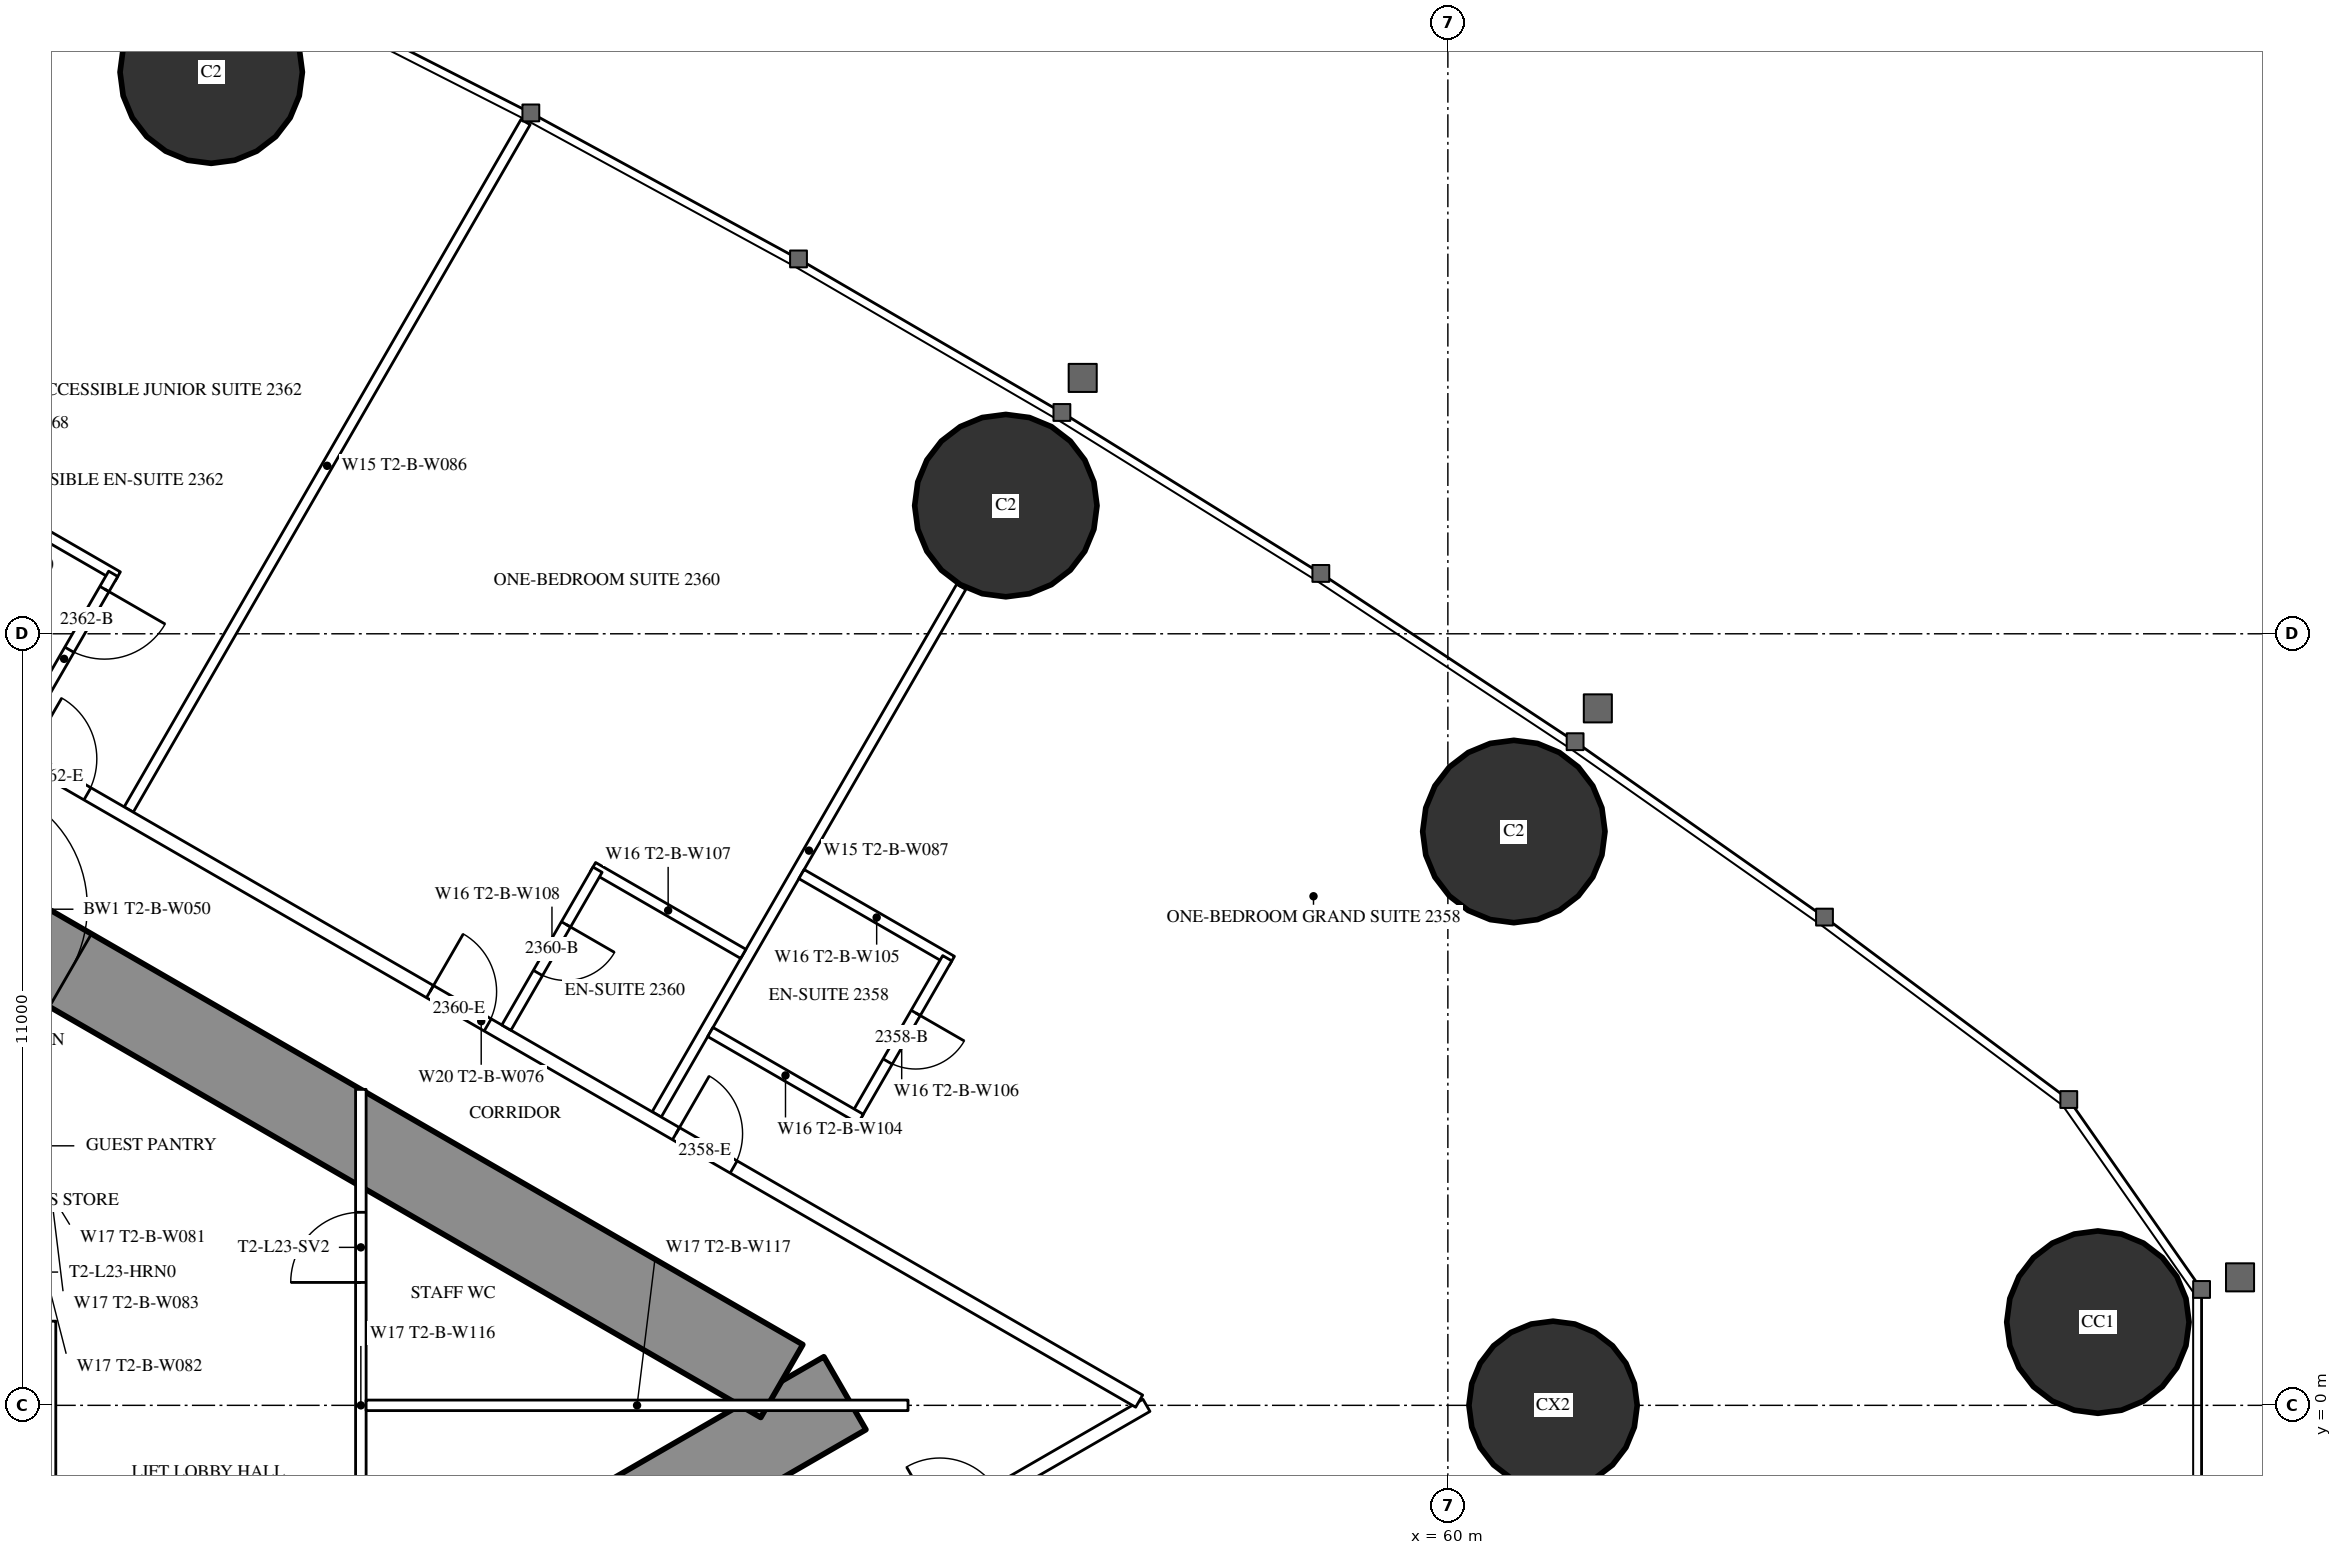
"""IFC4 building model, lengths in metres.
Left out: names, types, materials, properties, quantities, classifications, styles, units other than length and angle.
Written with IfcOpenShell. Run it as: python <this file> out.ifc"""

import sys

from ifc_helpers import new_model, si_unit, direction, frame, frame_2d, origin, origin_2d, place, context, subcontext, project, spatial, rectangle, circle, hollow_circle, extrude, element, fill, save


model = new_model("IFC4")
c1 = context("Model", 3, precision=1e-05, world=origin(), true_north=direction((0.0, 1.0)))
c2 = subcontext(c1, "Body", "Model", "MODEL_VIEW")
j1 = project(units=[si_unit("LENGTHUNIT", "METRE"), si_unit("PLANEANGLEUNIT", "RADIAN")], contexts=[c1])
p1 = place(None, origin())
s1 = spatial("IfcSite", under=j1, at=p1, CompositionType="ELEMENT")
p2 = place(p1, origin())
s2 = spatial("IfcBuilding", under=s1, at=p2, CompositionType="ELEMENT")
p3 = place(p2, frame((0.0, 0.0, 90.6)))
s3 = spatial("IfcBuildingStorey", under=s2, at=p3, CompositionType="ELEMENT", Elevation=90.6)
for number, where, z_axis, x_axis in (
    (1, (69.269, 1.187, 0.0), (0.0, 0.0, 1.0), (1.0, 0.0, 0.0)),
    (2, (60.941, 8.181, 0.0), (0.0, 0.0, 1.0), (1.0, 0.0, 0.0)),
    (3, (53.697, 12.827, 0.0), (0.0, 0.0, 1.0), (1.0, 0.0, 0.0)),
    (4, (42.366, 19.007, 0.0), (0.0, 0.0, 1.0), (1.0, 0.0, 0.0)),
):
    element("IfcColumn", number, at=place(p3, frame(where, z_axis=z_axis, x_axis=x_axis)), inside=s3, PredefinedType="COLUMN", context=c2, shape_type="SweptSolid", body=[
        extrude(hollow_circle(Radius=1.3, WallThickness=0.1, at=origin_2d()), origin(), (0.0, 0.0, 1.0), 3.5),
    ])
p4 = place(p3, frame((61.5, 0.0, 0.0), z_axis=(0.0, 0.0, 1.0), x_axis=(1.0, 0.0, 0.0)))
e5 = element("IfcColumn", 5, at=p4, inside=s3, PredefinedType="COLUMN", context=c2, shape_type="SweptSolid", body=[
    extrude(circle(Radius=1.2, at=origin_2d()), origin(), (0.0, 0.0, 1.0), 3.5),
])
p5 = place(p3, frame((27.2, -13.8, 0.0), z_axis=(0.0, 0.0, 1.0), x_axis=(0.866027159892, 0.499996958321, 0.0)))
e6 = element("IfcWall", 6, at=p5, inside=s3, PredefinedType="SHEAR", context=c2, shape_type="SweptSolid", body=[
    extrude(rectangle(XDim=27.947, YDim=1.2, at=frame_2d((13.973, 0.0))), origin(), (0.0, 0.0, 1.0), 3.5),
])
p6 = place(p5, frame((4.6, 0.0, 0.0)))
e7 = element("IfcOpeningElement", 7, at=p6, cuts=e6, PredefinedType="OPENING", context=c2, shape_type="SweptSolid", body=[
    extrude(rectangle(XDim=1.0, YDim=2.2, at=frame_2d((0.5, 1.1))), frame((0.0, 0.61, 0.0), z_axis=(0.0, -1.0, 0.0), x_axis=(1.0, 0.0, 0.0)), (0.0, 0.0, 1.0), 1.22),
])
p7 = place(p5, frame((13.395, 0.0, 0.0)))
e8 = element("IfcOpeningElement", 8, at=p7, cuts=e6, PredefinedType="OPENING", context=c2, shape_type="SweptSolid", body=[
    extrude(rectangle(XDim=1.8, YDim=2.2, at=frame_2d((0.9, 1.1))), frame((0.0, 0.61, 0.0), z_axis=(0.0, -1.0, 0.0), x_axis=(1.0, 0.0, 0.0)), (0.0, 0.0, 1.0), 1.22),
])
p8 = place(p3, frame((27.2, 13.8, 0.0), z_axis=(0.0, 0.0, 1.0), x_axis=(0.866024515034, -0.500001539357, 0.0)))
e9 = element("IfcWall", 9, at=p8, inside=s3, PredefinedType="SHEAR", context=c2, shape_type="SweptSolid", body=[
    extrude(rectangle(XDim=26.907, YDim=1.2, at=frame_2d((13.454, 0.0))), origin(), (0.0, 0.0, 1.0), 3.5),
])
p9 = place(p8, frame((4.6, 0.0, 0.0)))
e10 = element("IfcOpeningElement", 10, at=p9, cuts=e9, PredefinedType="OPENING", context=c2, shape_type="SweptSolid", body=[
    extrude(rectangle(XDim=1.0, YDim=2.2, at=frame_2d((0.5, 1.1))), frame((0.0, 0.61, 0.0), z_axis=(0.0, -1.0, 0.0), x_axis=(1.0, 0.0, 0.0)), (0.0, 0.0, 1.0), 1.22),
])
p10 = place(p8, frame((13.395, 0.0, 0.0)))
e11 = element("IfcOpeningElement", 11, at=p10, cuts=e9, PredefinedType="OPENING", context=c2, shape_type="SweptSolid", body=[
    extrude(rectangle(XDim=1.8, YDim=2.2, at=frame_2d((0.9, 1.1))), frame((0.0, 0.61, 0.0), z_axis=(0.0, -1.0, 0.0), x_axis=(1.0, 0.0, 0.0)), (0.0, 0.0, 1.0), 1.22),
])
p11 = place(p3, frame((41.19, 8.494, 0.0), z_axis=(0.0, 0.0, 1.0), x_axis=(0.49999258054, 0.866029687369, 0.0)))
e12 = element("IfcWall", 12, at=p11, inside=s3, PredefinedType="PARTITIONING", context=c2, shape_type="SweptSolid", body=[
    extrude(rectangle(XDim=11.318, YDim=0.15, at=frame_2d((5.659, 0.0))), origin(), (0.0, 0.0, 1.0), 3.25),
])
p12 = place(p3, frame((48.719, 4.147, 0.0), z_axis=(0.0, 0.0, 1.0), x_axis=(0.499993328235, 0.866029255696, 0.0)))
e13 = element("IfcWall", 13, at=p12, inside=s3, PredefinedType="PARTITIONING", context=c2, shape_type="SweptSolid", body=[
    extrude(rectangle(XDim=8.686, YDim=0.15, at=frame_2d((4.343, 0.0))), origin(), (0.0, 0.0, 1.0), 2.2),
])
p13 = place(p3, frame((37.96, -10.243, 0.0), z_axis=(0.0, 0.0, 1.0), x_axis=(0.866026429433, 0.499998223521, 0.0)))
e14 = element("IfcWall", 14, at=p13, inside=s3, PredefinedType="PARTITIONING", context=c2, shape_type="SweptSolid", body=[
    extrude(rectangle(XDim=20.487, YDim=0.2, at=frame_2d((10.243, 0.0))), origin(), (0.0, 0.0, 1.0), 3.25),
])
p14 = place(p13, frame((4.047, 0.0, 0.0)))
e15 = element("IfcOpeningElement", 15, at=p14, cuts=e14, PredefinedType="OPENING", context=c2, shape_type="SweptSolid", body=[
    extrude(rectangle(XDim=0.95, YDim=2.2, at=frame_2d((0.475, 1.1))), frame((0.0, 0.11, 0.0), z_axis=(0.0, -1.0, 0.0), x_axis=(1.0, 0.0, 0.0)), (0.0, 0.0, 1.0), 0.22),
])
p15 = place(p13, frame((11.04, 0.0, 0.0)))
e16 = element("IfcOpeningElement", 16, at=p15, cuts=e14, PredefinedType="OPENING", context=c2, shape_type="SweptSolid", body=[
    extrude(rectangle(XDim=0.95, YDim=2.2, at=frame_2d((0.475, 1.1))), frame((0.0, 0.11, 0.0), z_axis=(0.0, -1.0, 0.0), x_axis=(1.0, 0.0, 0.0)), (0.0, 0.0, 1.0), 0.22),
])
p16 = place(p13, frame((13.035, 0.0, 0.0)))
e17 = element("IfcOpeningElement", 17, at=p16, cuts=e14, PredefinedType="OPENING", context=c2, shape_type="SweptSolid", body=[
    extrude(rectangle(XDim=0.95, YDim=2.2, at=frame_2d((0.475, 1.1))), frame((0.0, 0.11, 0.0), z_axis=(0.0, -1.0, 0.0), x_axis=(1.0, 0.0, 0.0)), (0.0, 0.0, 1.0), 0.22),
])
p17 = place(p13, frame((17.085, 0.0, 0.0)))
e18 = element("IfcOpeningElement", 18, at=p17, cuts=e14, PredefinedType="OPENING", context=c2, shape_type="SweptSolid", body=[
    extrude(rectangle(XDim=0.95, YDim=2.2, at=frame_2d((0.475, 1.1))), frame((0.0, 0.11, 0.0), z_axis=(0.0, -1.0, 0.0), x_axis=(1.0, 0.0, 0.0)), (0.0, 0.0, 1.0), 0.22),
])
p18 = place(p13, frame((1.048, 0.0, 0.0)))
e19 = element("IfcOpeningElement", 19, at=p18, cuts=e14, PredefinedType="OPENING", context=c2, shape_type="SweptSolid", body=[
    extrude(rectangle(XDim=1.8, YDim=2.2, at=frame_2d((0.9, 1.1))), frame((0.0, 0.11, 0.0), z_axis=(0.0, -1.0, 0.0), x_axis=(1.0, 0.0, 0.0)), (0.0, 0.0, 1.0), 0.22),
])
p19 = place(p3, frame((36.834, 10.894, 0.0), z_axis=(0.0, 0.0, 1.0), x_axis=(0.866028157229, -0.499995230863, 0.0)))
e20 = element("IfcWall", 20, at=p19, inside=s3, PredefinedType="PARTITIONING", context=c2, shape_type="SweptSolid", body=[
    extrude(rectangle(XDim=21.667, YDim=0.2, at=frame_2d((10.833, 0.0))), origin(), (0.0, 0.0, 1.0), 3.25),
])
p20 = place(p19, frame((14.04, 0.0, 0.0)))
e21 = element("IfcOpeningElement", 21, at=p20, cuts=e20, PredefinedType="OPENING", context=c2, shape_type="SweptSolid", body=[
    extrude(rectangle(XDim=0.95, YDim=2.2, at=frame_2d((0.475, 1.1))), frame((0.0, 0.11, 0.0), z_axis=(0.0, -1.0, 0.0), x_axis=(1.0, 0.0, 0.0)), (0.0, 0.0, 1.0), 0.22),
])
p21 = place(p19, frame((9.99, 0.0, 0.0)))
e22 = element("IfcOpeningElement", 22, at=p21, cuts=e20, PredefinedType="OPENING", context=c2, shape_type="SweptSolid", body=[
    extrude(rectangle(XDim=0.95, YDim=2.2, at=frame_2d((0.475, 1.1))), frame((0.0, 0.11, 0.0), z_axis=(0.0, -1.0, 0.0), x_axis=(1.0, 0.0, 0.0)), (0.0, 0.0, 1.0), 0.22),
])
p22 = place(p19, frame((3.35, 0.0, 0.0)))
e23 = element("IfcOpeningElement", 23, at=p22, cuts=e20, PredefinedType="OPENING", context=c2, shape_type="SweptSolid", body=[
    extrude(rectangle(XDim=1.0, YDim=2.2, at=frame_2d((0.5, 1.1))), frame((0.0, 0.11, 0.0), z_axis=(0.0, -1.0, 0.0), x_axis=(1.0, 0.0, 0.0)), (0.0, 0.0, 1.0), 0.22),
])
p23 = place(p3, frame((50.783, 7.574, 0.0), z_axis=(0.0, 0.0, 1.0), x_axis=(0.866006523861, -0.500032699561, 0.0)))
e24 = element("IfcWall", 24, at=p23, inside=s3, PredefinedType="PARTITIONING", context=c2, shape_type="SweptSolid", body=[
    extrude(rectangle(XDim=2.475, YDim=0.15, at=frame_2d((1.237, 0.0))), origin(), (0.0, 0.0, 1.0), 3.25),
])
p24 = place(p3, frame((51.562, 4.123, 0.0), z_axis=(0.0, 0.0, 1.0), x_axis=(0.49997716683, 0.86603858612, 0.0)))
e25 = element("IfcWall", 25, at=p24, inside=s3, PredefinedType="PARTITIONING", context=c2, shape_type="SweptSolid", body=[
    extrude(rectangle(XDim=2.6, YDim=0.15, at=frame_2d((1.3, 0.0))), origin(), (0.0, 0.0, 1.0), 3.25),
])
p25 = place(p24, frame((0.9, 0.0, 0.0)))
e26 = element("IfcOpeningElement", 26, at=p25, cuts=e25, PredefinedType="OPENING", context=c2, shape_type="SweptSolid", body=[
    extrude(rectangle(XDim=0.8, YDim=2.2, at=frame_2d((0.4, 1.1))), frame((0.0, 0.085, 0.0), z_axis=(0.0, -1.0, 0.0), x_axis=(1.0, 0.0, 0.0)), (0.0, 0.0, 1.0), 0.17),
])
for number, where, z_axis, x_axis in (
    (27, (49.483, 5.323, 0.0), (0.0, 0.0, 1.0), (0.866, -0.5, 0.0)),
    (28, (47.81, 7.674, 0.0), (0.0, 0.0, 1.0), (0.866, -0.5, 0.0)),
):
    element("IfcWall", number, at=place(p3, frame(where, z_axis=z_axis, x_axis=x_axis)), inside=s3, PredefinedType="PARTITIONING", context=c2, shape_type="SweptSolid", body=[
        extrude(rectangle(XDim=2.475, YDim=0.15, at=frame_2d((1.238, 0.0))), origin(), (0.0, 0.0, 1.0), 3.25),
    ])
p26 = place(p3, frame((46.575, 5.385, 0.0), z_axis=(0.0, 0.0, 1.0), x_axis=(0.500006934395, 0.866021400173, 0.0)))
e29 = element("IfcWall", 29, at=p26, inside=s3, PredefinedType="PARTITIONING", context=c2, shape_type="SweptSolid", body=[
    extrude(rectangle(XDim=2.6, YDim=0.15, at=frame_2d((1.3, 0.0))), origin(), (0.0, 0.0, 1.0), 3.25),
])
p27 = place(p26, frame((0.9, 0.0, 0.0)))
e30 = element("IfcOpeningElement", 30, at=p27, cuts=e29, PredefinedType="OPENING", context=c2, shape_type="SweptSolid", body=[
    extrude(rectangle(XDim=0.8, YDim=2.2, at=frame_2d((0.4, 1.1))), frame((0.0, 0.085, 0.0), z_axis=(0.0, -1.0, 0.0), x_axis=(1.0, 0.0, 0.0)), (0.0, 0.0, 1.0), 0.17),
])
p28 = place(p3, frame((38.544, 13.255, 0.0), z_axis=(0.0, 0.0, 1.0), x_axis=(0.866018712932, -0.500011588718, 0.0)))
e31 = element("IfcWall", 31, at=p28, inside=s3, PredefinedType="PARTITIONING", context=c2, shape_type="SweptSolid", body=[
    extrude(rectangle(XDim=2.875, YDim=0.15, at=frame_2d((1.438, 0.0))), origin(), (0.0, 0.0, 1.0), 3.25),
])
p29 = place(p3, frame((39.569, 9.43, 0.0), z_axis=(0.0, 0.0, 1.0), x_axis=(0.49998411664, 0.866034573852, 0.0)))
e32 = element("IfcWall", 32, at=p29, inside=s3, PredefinedType="PARTITIONING", context=c2, shape_type="SweptSolid", body=[
    extrude(rectangle(XDim=2.8, YDim=0.15, at=frame_2d((1.4, 0.0))), origin(), (0.0, 0.0, 1.0), 3.25),
])
p30 = place(p29, frame((1.55, 0.0, 0.0)))
e33 = element("IfcOpeningElement", 33, at=p30, cuts=e32, PredefinedType="OPENING", context=c2, shape_type="SweptSolid", body=[
    extrude(rectangle(XDim=1.0, YDim=2.2, at=frame_2d((0.5, 1.1))), frame((0.0, 0.085, 0.0), z_axis=(0.0, -1.0, 0.0), x_axis=(1.0, 0.0, 0.0)), (0.0, 0.0, 1.0), 0.17),
])
p31 = place(p3, frame((40.075, -5.674, 0.0), z_axis=(0.0, 0.0, 1.0), x_axis=(0.0, 1.0, 0.0)))
e34 = element("IfcWall", 34, at=p31, inside=s3, PredefinedType="PARTITIONING", context=c2, shape_type="SweptSolid", body=[
    extrude(rectangle(XDim=6.874, YDim=0.15, at=frame_2d((3.437, 0.0))), origin(), (0.0, 0.0, 1.0), 3.25),
])
p32 = place(p31, frame((2.537, 0.0, 0.0)))
e35 = element("IfcOpeningElement", 35, at=p32, cuts=e34, PredefinedType="OPENING", context=c2, shape_type="SweptSolid", body=[
    extrude(rectangle(XDim=1.8, YDim=2.2, at=frame_2d((0.9, 1.1))), frame((0.0, 0.085, 0.0), z_axis=(0.0, -1.0, 0.0), x_axis=(1.0, 0.0, 0.0)), (0.0, 0.0, 1.0), 0.17),
])
p33 = place(p3, frame((44.5, -4.505, 0.0), z_axis=(0.0, 0.0, 1.0), x_axis=(0.0, 1.0, 0.0)))
e36 = element("IfcWall", 36, at=p33, inside=s3, PredefinedType="PARTITIONING", context=c2, shape_type="SweptSolid", body=[
    extrude(rectangle(XDim=9.009, YDim=0.15, at=frame_2d((4.505, 0.0))), origin(), (0.0, 0.0, 1.0), 2.45),
])
p34 = place(p33, frame((1.752, 0.0, 0.0)))
e37 = element("IfcOpeningElement", 37, at=p34, cuts=e36, PredefinedType="OPENING", context=c2, shape_type="SweptSolid", body=[
    extrude(rectangle(XDim=1.0, YDim=2.2, at=frame_2d((0.5, 1.1))), frame((0.0, 0.085, 0.0), z_axis=(0.0, -1.0, 0.0), x_axis=(1.0, 0.0, 0.0)), (0.0, 0.0, 1.0), 0.17),
])
p35 = place(p33, frame((6.257, 0.0, 0.0)))
e38 = element("IfcOpeningElement", 38, at=p35, cuts=e36, PredefinedType="OPENING", context=c2, shape_type="SweptSolid", body=[
    extrude(rectangle(XDim=1.0, YDim=2.2, at=frame_2d((0.5, 1.1))), frame((0.0, 0.085, 0.0), z_axis=(0.0, -1.0, 0.0), x_axis=(1.0, 0.0, 0.0)), (0.0, 0.0, 1.0), 0.17),
])
p36 = place(p3, frame((44.575, 0.0, 0.0), z_axis=(0.0, 0.0, 1.0), x_axis=(1.0, 0.0, 0.0)))
e39 = element("IfcWall", 39, at=p36, inside=s3, PredefinedType="PARTITIONING", context=c2, shape_type="SweptSolid", body=[
    extrude(rectangle(XDim=7.727, YDim=0.15, at=frame_2d((3.864, 0.0))), origin(), (0.0, 0.0, 1.0), 2.2),
])
p37 = place(p25, origin())
e40 = element("IfcDoor", 40, at=p37, inside=s3, OperationType="SINGLE_SWING_RIGHT", PredefinedType="DOOR", context=c2, shape_type="SweptSolid", body=[
    extrude(rectangle(XDim=0.8, YDim=2.2, at=frame_2d((0.4, 1.1))), frame((0.0, 0.025, 0.0), z_axis=(0.0, -1.0, 0.0), x_axis=(1.0, 0.0, 0.0)), (0.0, 0.0, 1.0), 0.05),
])
fill(e26, e40)
p38 = place(p20, origin())
e41 = element("IfcDoor", 41, at=p38, inside=s3, OperationType="SINGLE_SWING_LEFT", PredefinedType="DOOR", context=c2, shape_type="SweptSolid", body=[
    extrude(rectangle(XDim=0.95, YDim=2.2, at=frame_2d((0.475, 1.1))), frame((0.0, 0.025, 0.0), z_axis=(0.0, -1.0, 0.0), x_axis=(1.0, 0.0, 0.0)), (0.0, 0.0, 1.0), 0.05),
])
fill(e21, e41)
p39 = place(p27, origin())
e42 = element("IfcDoor", 42, at=p39, inside=s3, OperationType="SINGLE_SWING_RIGHT", PredefinedType="DOOR", context=c2, shape_type="SweptSolid", body=[
    extrude(rectangle(XDim=0.8, YDim=2.2, at=frame_2d((0.4, 1.1))), frame((0.0, 0.025, 0.0), z_axis=(0.0, -1.0, 0.0), x_axis=(1.0, 0.0, 0.0)), (0.0, 0.0, 1.0), 0.05),
])
fill(e30, e42)
p40 = place(p21, origin())
e43 = element("IfcDoor", 43, at=p40, inside=s3, OperationType="SINGLE_SWING_LEFT", PredefinedType="DOOR", context=c2, shape_type="SweptSolid", body=[
    extrude(rectangle(XDim=0.95, YDim=2.2, at=frame_2d((0.475, 1.1))), frame((0.0, 0.025, 0.0), z_axis=(0.0, -1.0, 0.0), x_axis=(1.0, 0.0, 0.0)), (0.0, 0.0, 1.0), 0.05),
])
fill(e22, e43)
p41 = place(p30, origin())
e44 = element("IfcDoor", 44, at=p41, inside=s3, OperationType="SINGLE_SWING_RIGHT", PredefinedType="DOOR", context=c2, shape_type="SweptSolid", body=[
    extrude(rectangle(XDim=1.0, YDim=2.2, at=frame_2d((0.5, 1.1))), frame((0.0, 0.025, 0.0), z_axis=(0.0, -1.0, 0.0), x_axis=(1.0, 0.0, 0.0)), (0.0, 0.0, 1.0), 0.05),
])
fill(e33, e44)
p42 = place(p22, origin())
e45 = element("IfcDoor", 45, at=p42, inside=s3, OperationType="SINGLE_SWING_LEFT", PredefinedType="DOOR", context=c2, shape_type="SweptSolid", body=[
    extrude(rectangle(XDim=1.0, YDim=2.2, at=frame_2d((0.5, 1.1))), frame((0.0, 0.025, 0.0), z_axis=(0.0, -1.0, 0.0), x_axis=(1.0, 0.0, 0.0)), (0.0, 0.0, 1.0), 0.05),
])
fill(e23, e45)
p43 = place(p35, origin())
e46 = element("IfcDoor", 46, at=p43, inside=s3, OperationType="SINGLE_SWING_LEFT", PredefinedType="DOOR", context=c2, shape_type="SweptSolid", body=[
    extrude(rectangle(XDim=1.0, YDim=2.2, at=frame_2d((0.5, 1.1))), frame((0.0, 0.025, 0.0), z_axis=(0.0, -1.0, 0.0), x_axis=(1.0, 0.0, 0.0)), (0.0, 0.0, 1.0), 0.05),
])
fill(e38, e46)
p44 = place(p10, origin())
e47 = element("IfcDoor", 47, at=p44, inside=s3, OperationType="DOUBLE_DOOR_SINGLE_SWING", PredefinedType="DOOR", context=c2, shape_type="SweptSolid", body=[
    extrude(rectangle(XDim=1.8, YDim=2.2, at=frame_2d((0.9, 1.1))), frame((0.0, 0.025, 0.0), z_axis=(0.0, -1.0, 0.0), x_axis=(1.0, 0.0, 0.0)), (0.0, 0.0, 1.0), 0.05),
])
fill(e11, e47)
save(model, sys.argv[1])
